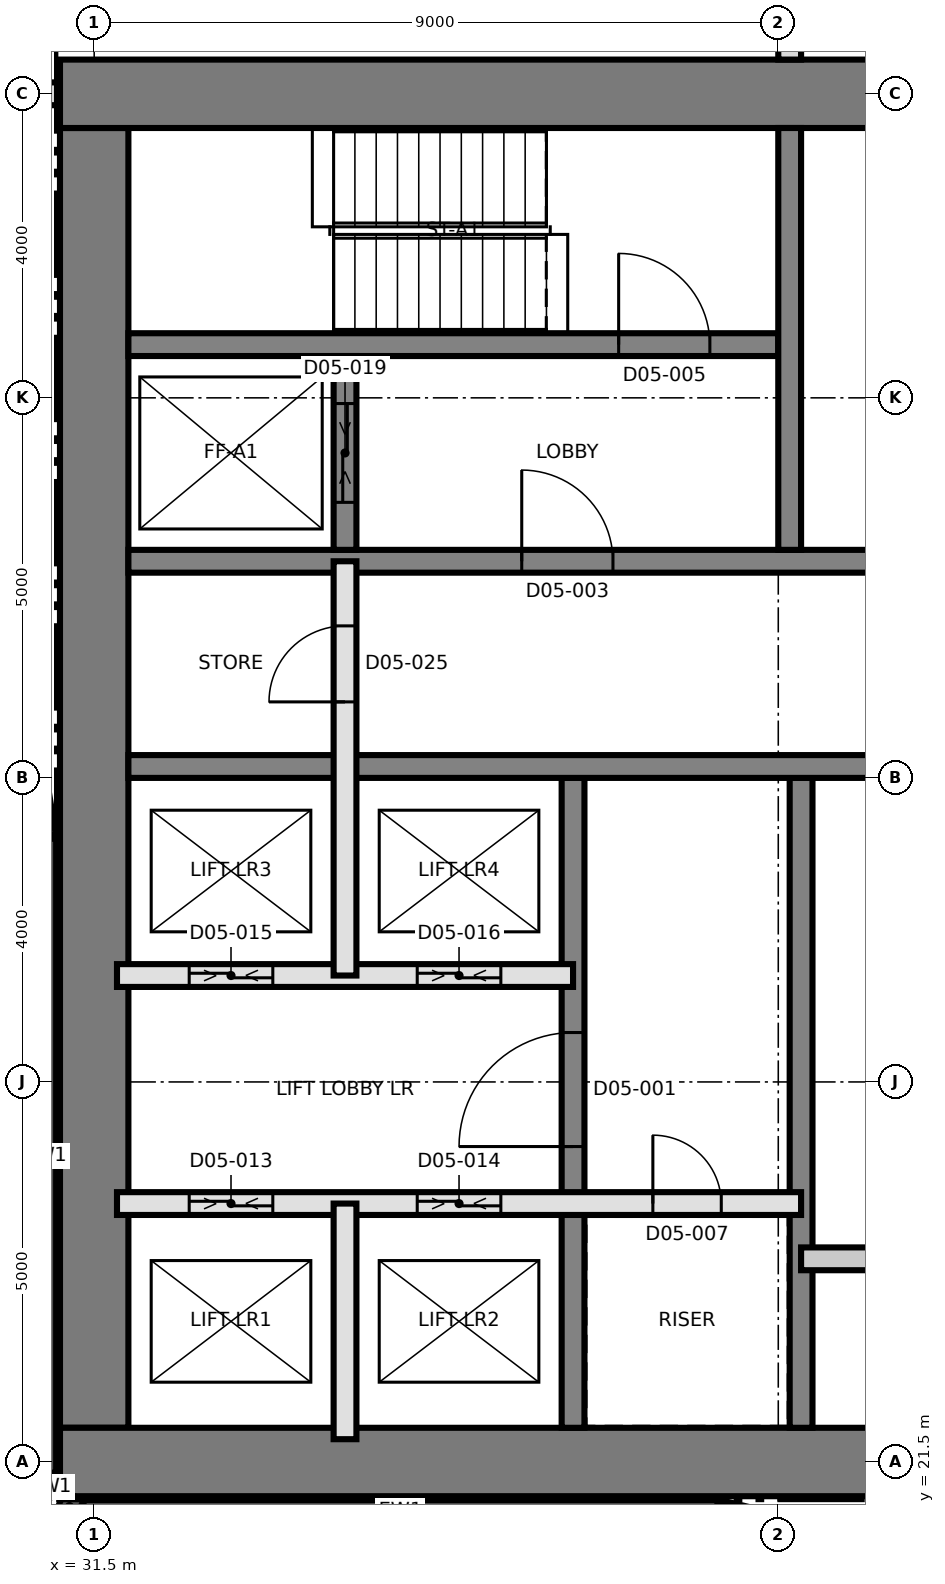
"""IFC4 building model, lengths in metres.
Left out: names, types, materials, properties, quantities, classifications, styles, units other than length and angle.
Written with IfcOpenShell. Run it as: python <this file> out.ifc"""

import sys

from ifc_helpers import new_model, si_unit, direction, frame, frame_2d, origin, place, context, subcontext, project, spatial, rectangle, extrude, element, fill, save


model = new_model("IFC4")
c1 = context("Model", 3, precision=1e-05, world=origin(), true_north=direction((0.0, 1.0)))
c2 = subcontext(c1, "Body", "Model", "MODEL_VIEW")
j1 = project(units=[si_unit("LENGTHUNIT", "METRE"), si_unit("PLANEANGLEUNIT", "RADIAN")], contexts=[c1])
p1 = place(None, origin())
s1 = spatial("IfcSite", under=j1, at=p1, CompositionType="ELEMENT")
p2 = place(p1, origin())
s2 = spatial("IfcBuilding", under=s1, at=p2, CompositionType="ELEMENT")
p3 = place(p2, frame((0.0, 0.0, 70.5)))
s3 = spatial("IfcBuildingStorey", under=s2, at=p3, CompositionType="ELEMENT", Elevation=70.5)
p4 = place(p3, frame((31.5, 21.95, 0.0), z_axis=(0.0, 0.0, 1.0), x_axis=(0.0, 1.0, 0.0)))
e1 = element("IfcWall", 1, at=p4, inside=s3, PredefinedType="SHEAR", context=c2, shape_type="SweptSolid", body=[
    extrude(rectangle(XDim=17.1, YDim=0.9, at=frame_2d((8.55, 0.0))), origin(), (0.0, 0.0, 1.0), 3.7),
])
p5 = place(p3, frame((31.05, 21.5, 0.0), z_axis=(0.0, 0.0, 1.0), x_axis=(1.0, 0.0, 0.0)))
e2 = element("IfcWall", 2, at=p5, inside=s3, PredefinedType="SHEAR", context=c2, shape_type="SweptSolid", body=[
    extrude(rectangle(XDim=27.0, YDim=0.9, at=frame_2d((13.5, 0.0))), origin(), (0.0, 0.0, 1.0), 3.7),
])
p6 = place(p3, frame((31.05, 39.5, 0.0), z_axis=(0.0, 0.0, 1.0), x_axis=(1.0, 0.0, 0.0)))
e3 = element("IfcWall", 3, at=p6, inside=s3, PredefinedType="SHEAR", context=c2, shape_type="SweptSolid", body=[
    extrude(rectangle(XDim=27.0, YDim=0.9, at=frame_2d((13.5, 0.0))), origin(), (0.0, 0.0, 1.0), 3.7),
])
p7 = place(p6, frame((10.65, 0.0, 0.0)))
e4 = element("IfcOpeningElement", 4, at=p7, cuts=e3, PredefinedType="OPENING", context=c2, shape_type="SweptSolid", body=[
    extrude(rectangle(XDim=1.2, YDim=2.1, at=frame_2d((0.6, 1.05))), frame((0.0, 0.46, 0.0), z_axis=(0.0, -1.0, 0.0), x_axis=(1.0, 0.0, 0.0)), (0.0, 0.0, 1.0), 0.92),
])
p8 = place(p3, frame((37.8, 21.95, 0.0), z_axis=(0.0, 0.0, 1.0), x_axis=(0.0, 1.0, 0.0)))
e5 = element("IfcWall", 5, at=p8, inside=s3, PredefinedType="SHEAR", context=c2, shape_type="SweptSolid", body=[
    extrude(rectangle(XDim=8.55, YDim=0.3, at=frame_2d((4.275, 0.0))), origin(), (0.0, 0.0, 1.0), 3.7),
])
p9 = place(p8, frame((3.7, 0.0, 0.0)))
e6 = element("IfcOpeningElement", 6, at=p9, cuts=e5, PredefinedType="OPENING", context=c2, shape_type="SweptSolid", body=[
    extrude(rectangle(XDim=1.5, YDim=2.1, at=frame_2d((0.75, 1.05))), frame((0.0, 0.16, 0.0), z_axis=(0.0, -1.0, 0.0), x_axis=(1.0, 0.0, 0.0)), (0.0, 0.0, 1.0), 0.32),
])
p10 = place(p3, frame((40.8, 21.95, 0.0), z_axis=(0.0, 0.0, 1.0), x_axis=(0.0, 1.0, 0.0)))
e7 = element("IfcWall", 7, at=p10, inside=s3, PredefinedType="SHEAR", context=c2, shape_type="SweptSolid", body=[
    extrude(rectangle(XDim=8.55, YDim=0.3, at=frame_2d((4.275, 0.0))), origin(), (0.0, 0.0, 1.0), 3.7),
])
p11 = place(p3, frame((31.95, 30.65, 0.0), z_axis=(0.0, 0.0, 1.0), x_axis=(1.0, 0.0, 0.0)))
e8 = element("IfcWall", 8, at=p11, inside=s3, PredefinedType="SHEAR", context=c2, shape_type="SweptSolid", body=[
    extrude(rectangle(XDim=26.1, YDim=0.3, at=frame_2d((13.05, 0.0))), origin(), (0.0, 0.0, 1.0), 3.7),
])
p12 = place(p11, frame((24.55, 0.0, 0.0)))
e9 = element("IfcOpeningElement", 9, at=p12, cuts=e8, PredefinedType="OPENING", context=c2, shape_type="SweptSolid", body=[
    extrude(rectangle(XDim=1.0, YDim=2.1, at=frame_2d((0.5, 1.05))), frame((0.0, 0.16, 0.0), z_axis=(0.0, -1.0, 0.0), x_axis=(1.0, 0.0, 0.0)), (0.0, 0.0, 1.0), 0.32),
])
p13 = place(p11, frame((11.35, 0.0, 0.0)))
e10 = element("IfcOpeningElement", 10, at=p13, cuts=e8, PredefinedType="OPENING", context=c2, shape_type="SweptSolid", body=[
    extrude(rectangle(XDim=1.0, YDim=2.1, at=frame_2d((0.5, 1.05))), frame((0.0, 0.16, 0.0), z_axis=(0.0, -1.0, 0.0), x_axis=(1.0, 0.0, 0.0)), (0.0, 0.0, 1.0), 0.32),
])
p14 = place(p3, frame((31.95, 33.35, 0.0), z_axis=(0.0, 0.0, 1.0), x_axis=(1.0, 0.0, 0.0)))
e11 = element("IfcWall", 11, at=p14, inside=s3, PredefinedType="SHEAR", context=c2, shape_type="SweptSolid", body=[
    extrude(rectangle(XDim=26.1, YDim=0.3, at=frame_2d((13.05, 0.0))), origin(), (0.0, 0.0, 1.0), 3.7),
])
p15 = place(p14, frame((13.7, 0.0, 0.0)))
e12 = element("IfcOpeningElement", 12, at=p15, cuts=e11, PredefinedType="OPENING", context=c2, shape_type="SweptSolid", body=[
    extrude(rectangle(XDim=1.4, YDim=2.1, at=frame_2d((0.7, 1.05))), frame((0.0, 0.16, 0.0), z_axis=(0.0, -1.0, 0.0), x_axis=(1.0, 0.0, 0.0)), (0.0, 0.0, 1.0), 0.32),
])
p16 = place(p14, frame((5.175, 0.0, 0.0)))
e13 = element("IfcOpeningElement", 13, at=p16, cuts=e11, PredefinedType="OPENING", context=c2, shape_type="SweptSolid", body=[
    extrude(rectangle(XDim=1.2, YDim=2.1, at=frame_2d((0.6, 1.05))), frame((0.0, 0.16, 0.0), z_axis=(0.0, -1.0, 0.0), x_axis=(1.0, 0.0, 0.0)), (0.0, 0.0, 1.0), 0.32),
])
p17 = place(p14, frame((19.725, 0.0, 0.0)))
e14 = element("IfcOpeningElement", 14, at=p17, cuts=e11, PredefinedType="OPENING", context=c2, shape_type="SweptSolid", body=[
    extrude(rectangle(XDim=1.2, YDim=2.1, at=frame_2d((0.6, 1.05))), frame((0.0, 0.16, 0.0), z_axis=(0.0, -1.0, 0.0), x_axis=(1.0, 0.0, 0.0)), (0.0, 0.0, 1.0), 0.32),
])
p18 = place(p3, frame((31.95, 36.2, 0.0), z_axis=(0.0, 0.0, 1.0), x_axis=(1.0, 0.0, 0.0)))
e15 = element("IfcWall", 15, at=p18, inside=s3, PredefinedType="SHEAR", context=c2, shape_type="SweptSolid", body=[
    extrude(rectangle(XDim=8.55, YDim=0.3, at=frame_2d((4.275, 0.0))), origin(), (0.0, 0.0, 1.0), 3.7),
])
p19 = place(p18, frame((6.45, 0.0, 0.0)))
e16 = element("IfcOpeningElement", 16, at=p19, cuts=e15, PredefinedType="OPENING", context=c2, shape_type="SweptSolid", body=[
    extrude(rectangle(XDim=1.2, YDim=2.1, at=frame_2d((0.6, 1.05))), frame((0.0, 0.16, 0.0), z_axis=(0.0, -1.0, 0.0), x_axis=(1.0, 0.0, 0.0)), (0.0, 0.0, 1.0), 0.32),
])
p20 = place(p3, frame((40.65, 33.5, 0.0), z_axis=(0.0, 0.0, 1.0), x_axis=(0.0, 1.0, 0.0)))
e17 = element("IfcWall", 17, at=p20, inside=s3, PredefinedType="SHEAR", context=c2, shape_type="SweptSolid", body=[
    extrude(rectangle(XDim=5.55, YDim=0.3, at=frame_2d((2.775, 0.0))), origin(), (0.0, 0.0, 1.0), 3.7),
])
p21 = place(p3, frame((34.8, 33.5, 0.0), z_axis=(0.0, 0.0, 1.0), x_axis=(0.0, 1.0, 0.0)))
e18 = element("IfcWall", 18, at=p21, inside=s3, PredefinedType="SHEAR", context=c2, shape_type="SweptSolid", body=[
    extrude(rectangle(XDim=2.55, YDim=0.3, at=frame_2d((1.275, 0.0))), origin(), (0.0, 0.0, 1.0), 3.7),
])
p22 = place(p21, frame((0.625, 0.0, 0.0)))
e19 = element("IfcOpeningElement", 19, at=p22, cuts=e18, PredefinedType="OPENING", context=c2, shape_type="SweptSolid", body=[
    extrude(rectangle(XDim=1.3, YDim=2.4, at=frame_2d((0.65, 1.2))), frame((0.0, 0.16, 0.0), z_axis=(0.0, -1.0, 0.0), x_axis=(1.0, 0.0, 0.0)), (0.0, 0.0, 1.0), 0.32),
])
p23 = place(p3, frame((30.85, 29.699, 0.0), z_axis=(0.0, 0.0, 1.0), x_axis=(0.0, -1.0, 0.0)))
e20 = element("IfcWall", 20, at=p23, inside=s3, PredefinedType="SOLIDWALL", context=c2, shape_type="SweptSolid", body=[
    extrude(rectangle(XDim=8.34, YDim=0.3, at=frame_2d((4.17, 0.0))), origin(), (0.0, 0.0, 1.0), 3.4),
])
for number, where, z_axis, x_axis in (
    (21, (30.861, 21.302, 0.0), (0.0, 0.0, 1.0), (0.383, -0.924, 0.0)),
    (22, (31.048, 20.967, 0.0), (0.0, 0.0, 1.0), (0.924, -0.383, 0.0)),
):
    element("IfcWall", number, at=place(p3, frame(where, z_axis=z_axis, x_axis=x_axis)), inside=s3, PredefinedType="SOLIDWALL", context=c2, shape_type="SweptSolid", body=[
        extrude(rectangle(XDim=0.275, YDim=0.3, at=frame_2d((0.138, 0.0))), origin(), (0.0, 0.0, 1.0), 3.4),
    ])
p24 = place(p3, frame((31.36, 20.85, 0.0), z_axis=(0.0, 0.0, 1.0), x_axis=(1.0, 0.0, 0.0)))
e23 = element("IfcWall", 23, at=p24, inside=s3, PredefinedType="SOLIDWALL", context=c2, shape_type="SweptSolid", body=[
    extrude(rectangle(XDim=8.34, YDim=0.3, at=frame_2d((4.17, 0.0))), origin(), (0.0, 0.0, 1.0), 3.4),
])
p25 = place(p3, frame((39.735, 20.846, 0.0), z_axis=(0.0, 0.0, 1.0), x_axis=(0.97206095595, -0.234728562212, 0.0)))
e24 = element("IfcWall", 24, at=p25, inside=s3, PredefinedType="SOLIDWALL", context=c2, shape_type="SweptSolid", body=[
    extrude(rectangle(XDim=2.35, YDim=0.3, at=frame_2d((1.175, 0.0))), origin(), (0.0, 0.0, 1.0), 3.4),
])
p26 = place(p3, frame((30.152, 34.0, 0.0), z_axis=(0.0, 0.0, 1.0), x_axis=(0.160697303067, -0.987003736967, 0.0)))
e25 = element("IfcWall", 25, at=p26, inside=s3, PredefinedType="SOLIDWALL", context=c2, shape_type="SweptSolid", body=[
    extrude(rectangle(XDim=4.333, YDim=0.3, at=frame_2d((2.167, 0.0))), origin(), (0.0, 0.0, 1.0), 3.4),
])
p27 = place(p26, frame((0.366, 0.0, 0.9)))
e26 = element("IfcOpeningElement", 26, at=p27, cuts=e25, PredefinedType="OPENING", context=c2, shape_type="SweptSolid", body=[
    extrude(rectangle(XDim=3.6, YDim=1.5, at=frame_2d((1.8, 0.75))), frame((0.0, 0.16, 0.0), z_axis=(0.0, -1.0, 0.0), x_axis=(1.0, 0.0, 0.0)), (0.0, 0.0, 1.0), 0.32),
])
p28 = place(p3, frame((40.8, 24.173, 0.0), z_axis=(0.0, 0.0, 1.0), x_axis=(1.0, 0.0, 0.0)))
e27 = element("IfcWall", 27, at=p28, inside=s3, PredefinedType="PARTITIONING", context=c2, shape_type="SweptSolid", body=[
    extrude(rectangle(XDim=6.0, YDim=0.3, at=frame_2d((3.0, 0.0))), origin(), (0.0, 0.0, 1.0), 3.4),
])
p29 = place(p28, frame((2.5, 0.0, 0.0)))
e28 = element("IfcOpeningElement", 28, at=p29, cuts=e27, PredefinedType="OPENING", context=c2, shape_type="SweptSolid", body=[
    extrude(rectangle(XDim=1.0, YDim=2.1, at=frame_2d((0.5, 1.05))), frame((0.0, 0.16, 0.0), z_axis=(0.0, -1.0, 0.0), x_axis=(1.0, 0.0, 0.0)), (0.0, 0.0, 1.0), 0.32),
])
p30 = place(p3, frame((31.8, 24.9, 0.0), z_axis=(0.0, 0.0, 1.0), x_axis=(1.0, 0.0, 0.0)))
e29 = element("IfcWall", 29, at=p30, inside=s3, PredefinedType="SOLIDWALL", context=c2, shape_type="SweptSolid", body=[
    extrude(rectangle(XDim=9.0, YDim=0.3, at=frame_2d((4.5, 0.0))), origin(), (0.0, 0.0, 1.0), 3.4),
])
p31 = place(p30, frame((7.05, 0.0, 0.0)))
e30 = element("IfcOpeningElement", 30, at=p31, cuts=e29, PredefinedType="OPENING", context=c2, shape_type="SweptSolid", body=[
    extrude(rectangle(XDim=0.9, YDim=2.1, at=frame_2d((0.45, 1.05))), frame((0.0, 0.16, 0.0), z_axis=(0.0, -1.0, 0.0), x_axis=(1.0, 0.0, 0.0)), (0.0, 0.0, 1.0), 0.32),
])
p32 = place(p30, frame((0.95, 0.0, 0.0)))
e31 = element("IfcOpeningElement", 31, at=p32, cuts=e29, PredefinedType="OPENING", context=c2, shape_type="SweptSolid", body=[
    extrude(rectangle(XDim=1.1, YDim=2.4, at=frame_2d((0.55, 1.2))), frame((0.0, 0.16, 0.0), z_axis=(0.0, -1.0, 0.0), x_axis=(1.0, 0.0, 0.0)), (0.0, 0.0, 1.0), 0.32),
])
p33 = place(p30, frame((3.95, 0.0, 0.0)))
e32 = element("IfcOpeningElement", 32, at=p33, cuts=e29, PredefinedType="OPENING", context=c2, shape_type="SweptSolid", body=[
    extrude(rectangle(XDim=1.1, YDim=2.4, at=frame_2d((0.55, 1.2))), frame((0.0, 0.16, 0.0), z_axis=(0.0, -1.0, 0.0), x_axis=(1.0, 0.0, 0.0)), (0.0, 0.0, 1.0), 0.32),
])
p34 = place(p3, frame((31.8, 27.9, 0.0), z_axis=(0.0, 0.0, 1.0), x_axis=(1.0, 0.0, 0.0)))
e33 = element("IfcWall", 33, at=p34, inside=s3, PredefinedType="SOLIDWALL", context=c2, shape_type="SweptSolid", body=[
    extrude(rectangle(XDim=6.0, YDim=0.3, at=frame_2d((3.0, 0.0))), origin(), (0.0, 0.0, 1.0), 3.4),
])
p35 = place(p34, frame((0.95, 0.0, 0.0)))
e34 = element("IfcOpeningElement", 34, at=p35, cuts=e33, PredefinedType="OPENING", context=c2, shape_type="SweptSolid", body=[
    extrude(rectangle(XDim=1.1, YDim=2.4, at=frame_2d((0.55, 1.2))), frame((0.0, 0.16, 0.0), z_axis=(0.0, -1.0, 0.0), x_axis=(1.0, 0.0, 0.0)), (0.0, 0.0, 1.0), 0.32),
])
p36 = place(p34, frame((3.95, 0.0, 0.0)))
e35 = element("IfcOpeningElement", 35, at=p36, cuts=e33, PredefinedType="OPENING", context=c2, shape_type="SweptSolid", body=[
    extrude(rectangle(XDim=1.1, YDim=2.4, at=frame_2d((0.55, 1.2))), frame((0.0, 0.16, 0.0), z_axis=(0.0, -1.0, 0.0), x_axis=(1.0, 0.0, 0.0)), (0.0, 0.0, 1.0), 0.32),
])
p37 = place(p3, frame((34.8, 21.8, 0.0), z_axis=(0.0, 0.0, 1.0), x_axis=(0.0, 1.0, 0.0)))
e36 = element("IfcWall", 36, at=p37, inside=s3, PredefinedType="SOLIDWALL", context=c2, shape_type="SweptSolid", body=[
    extrude(rectangle(XDim=3.1, YDim=0.3, at=frame_2d((1.55, 0.0))), origin(), (0.0, 0.0, 1.0), 3.4),
])
p38 = place(p3, frame((34.8, 27.9, 0.0), z_axis=(0.0, 0.0, 1.0), x_axis=(0.0, 1.0, 0.0)))
e37 = element("IfcWall", 37, at=p38, inside=s3, PredefinedType="SOLIDWALL", context=c2, shape_type="SweptSolid", body=[
    extrude(rectangle(XDim=5.45, YDim=0.3, at=frame_2d((2.725, 0.0))), origin(), (0.0, 0.0, 1.0), 3.4),
])
p39 = place(p38, frame((3.6, 0.0, 0.0)))
e38 = element("IfcOpeningElement", 38, at=p39, cuts=e37, PredefinedType="OPENING", context=c2, shape_type="SweptSolid", body=[
    extrude(rectangle(XDim=1.0, YDim=2.1, at=frame_2d((0.5, 1.05))), frame((0.0, 0.16, 0.0), z_axis=(0.0, -1.0, 0.0), x_axis=(1.0, 0.0, 0.0)), (0.0, 0.0, 1.0), 0.32),
])
p40 = place(p3, frame((30.35, 39.5, 0.0), z_axis=(0.0, 0.0, 1.0), x_axis=(1.0, 0.0, 0.0)))
e39 = element("IfcWall", 39, at=p40, inside=s3, PredefinedType="PARTITIONING", context=c2, shape_type="SweptSolid", body=[
    extrude(rectangle(XDim=0.68, YDim=0.3, at=frame_2d((0.34, 0.0))), origin(), (0.0, 0.0, 1.0), 3.4),
])
p41 = place(p3, frame((40.65, 39.95, 0.0), z_axis=(0.0, 0.0, 1.0), x_axis=(0.0, 1.0, 0.0)))
e40 = element("IfcWall", 40, at=p41, inside=s3, PredefinedType="PARTITIONING", context=c2, shape_type="SweptSolid", body=[
    extrude(rectangle(XDim=36.94, YDim=0.3, at=frame_2d((18.47, 0.0))), origin(), (0.0, 0.0, 1.0), 3.4),
])
p42 = place(p41, frame((0.7, 0.0, 0.0)))
e41 = element("IfcOpeningElement", 41, at=p42, cuts=e40, PredefinedType="OPENING", context=c2, shape_type="SweptSolid", body=[
    extrude(rectangle(XDim=1.0, YDim=2.1, at=frame_2d((0.5, 1.05))), frame((0.0, 0.16, 0.0), z_axis=(0.0, -1.0, 0.0), x_axis=(1.0, 0.0, 0.0)), (0.0, 0.0, 1.0), 0.32),
])
p43 = place(p41, frame((6.55, 0.0, 0.0)))
e42 = element("IfcOpeningElement", 42, at=p43, cuts=e40, PredefinedType="OPENING", context=c2, shape_type="SweptSolid", body=[
    extrude(rectangle(XDim=1.0, YDim=2.1, at=frame_2d((0.5, 1.05))), frame((0.0, 0.16, 0.0), z_axis=(0.0, -1.0, 0.0), x_axis=(1.0, 0.0, 0.0)), (0.0, 0.0, 1.0), 0.32),
])
p44 = place(p41, frame((9.22, 0.0, 0.0)))
e43 = element("IfcOpeningElement", 43, at=p44, cuts=e40, PredefinedType="OPENING", context=c2, shape_type="SweptSolid", body=[
    extrude(rectangle(XDim=1.0, YDim=2.1, at=frame_2d((0.5, 1.05))), frame((0.0, 0.16, 0.0), z_axis=(0.0, -1.0, 0.0), x_axis=(1.0, 0.0, 0.0)), (0.0, 0.0, 1.0), 0.32),
])
p45 = place(p41, frame((15.07, 0.0, 0.0)))
e44 = element("IfcOpeningElement", 44, at=p45, cuts=e40, PredefinedType="OPENING", context=c2, shape_type="SweptSolid", body=[
    extrude(rectangle(XDim=1.0, YDim=2.1, at=frame_2d((0.5, 1.05))), frame((0.0, 0.16, 0.0), z_axis=(0.0, -1.0, 0.0), x_axis=(1.0, 0.0, 0.0)), (0.0, 0.0, 1.0), 0.32),
])
p46 = place(p41, frame((21.05, 0.0, 0.0)))
e45 = element("IfcOpeningElement", 45, at=p46, cuts=e40, PredefinedType="OPENING", context=c2, shape_type="SweptSolid", body=[
    extrude(rectangle(XDim=1.0, YDim=2.4, at=frame_2d((0.5, 1.2))), frame((0.0, 0.16, 0.0), z_axis=(0.0, -1.0, 0.0), x_axis=(1.0, 0.0, 0.0)), (0.0, 0.0, 1.0), 0.32),
])
p47 = place(p9, origin())
e46 = element("IfcDoor", 46, at=p47, inside=s3, OperationType="SINGLE_SWING_LEFT", PredefinedType="DOOR", context=c2, shape_type="SweptSolid", body=[
    extrude(rectangle(XDim=1.5, YDim=2.1, at=frame_2d((0.75, 1.05))), frame((0.0, 0.025, 0.0), z_axis=(0.0, -1.0, 0.0), x_axis=(1.0, 0.0, 0.0)), (0.0, 0.0, 1.0), 0.05),
])
fill(e6, e46)
p48 = place(p16, origin())
e47 = element("IfcDoor", 47, at=p48, inside=s3, OperationType="SINGLE_SWING_LEFT", PredefinedType="DOOR", context=c2, shape_type="SweptSolid", body=[
    extrude(rectangle(XDim=1.2, YDim=2.1, at=frame_2d((0.6, 1.05))), frame((0.0, 0.025, 0.0), z_axis=(0.0, -1.0, 0.0), x_axis=(1.0, 0.0, 0.0)), (0.0, 0.0, 1.0), 0.05),
])
fill(e13, e47)
p49 = place(p19, origin())
e48 = element("IfcDoor", 48, at=p49, inside=s3, OperationType="SINGLE_SWING_RIGHT", PredefinedType="DOOR", context=c2, shape_type="SweptSolid", body=[
    extrude(rectangle(XDim=1.2, YDim=2.1, at=frame_2d((0.6, 1.05))), frame((0.0, 0.025, 0.0), z_axis=(0.0, -1.0, 0.0), x_axis=(1.0, 0.0, 0.0)), (0.0, 0.0, 1.0), 0.05),
])
fill(e16, e48)
p50 = place(p31, origin())
e49 = element("IfcDoor", 49, at=p50, inside=s3, OperationType="SINGLE_SWING_LEFT", PredefinedType="DOOR", context=c2, shape_type="SweptSolid", body=[
    extrude(rectangle(XDim=0.9, YDim=2.1, at=frame_2d((0.45, 1.05))), frame((0.0, 0.025, 0.0), z_axis=(0.0, -1.0, 0.0), x_axis=(1.0, 0.0, 0.0)), (0.0, 0.0, 1.0), 0.05),
])
fill(e30, e49)
p51 = place(p32, origin())
e50 = element("IfcDoor", 50, at=p51, inside=s3, OperationType="SLIDING_TO_LEFT", PredefinedType="DOOR", context=c2, shape_type="SweptSolid", body=[
    extrude(rectangle(XDim=1.1, YDim=2.4, at=frame_2d((0.55, 1.2))), frame((0.0, 0.025, 0.0), z_axis=(0.0, -1.0, 0.0), x_axis=(1.0, 0.0, 0.0)), (0.0, 0.0, 1.0), 0.05),
])
fill(e31, e50)
p52 = place(p33, origin())
e51 = element("IfcDoor", 51, at=p52, inside=s3, OperationType="SLIDING_TO_LEFT", PredefinedType="DOOR", context=c2, shape_type="SweptSolid", body=[
    extrude(rectangle(XDim=1.1, YDim=2.4, at=frame_2d((0.55, 1.2))), frame((0.0, 0.025, 0.0), z_axis=(0.0, -1.0, 0.0), x_axis=(1.0, 0.0, 0.0)), (0.0, 0.0, 1.0), 0.05),
])
fill(e32, e51)
p53 = place(p35, origin())
e52 = element("IfcDoor", 52, at=p53, inside=s3, OperationType="SLIDING_TO_LEFT", PredefinedType="DOOR", context=c2, shape_type="SweptSolid", body=[
    extrude(rectangle(XDim=1.1, YDim=2.4, at=frame_2d((0.55, 1.2))), frame((0.0, 0.025, 0.0), z_axis=(0.0, -1.0, 0.0), x_axis=(1.0, 0.0, 0.0)), (0.0, 0.0, 1.0), 0.05),
])
fill(e34, e52)
p54 = place(p36, origin())
e53 = element("IfcDoor", 53, at=p54, inside=s3, OperationType="SLIDING_TO_LEFT", PredefinedType="DOOR", context=c2, shape_type="SweptSolid", body=[
    extrude(rectangle(XDim=1.1, YDim=2.4, at=frame_2d((0.55, 1.2))), frame((0.0, 0.025, 0.0), z_axis=(0.0, -1.0, 0.0), x_axis=(1.0, 0.0, 0.0)), (0.0, 0.0, 1.0), 0.05),
])
fill(e35, e53)
p55 = place(p22, origin())
e54 = element("IfcDoor", 54, at=p55, inside=s3, OperationType="SLIDING_TO_LEFT", PredefinedType="DOOR", context=c2, shape_type="SweptSolid", body=[
    extrude(rectangle(XDim=1.3, YDim=2.4, at=frame_2d((0.65, 1.2))), frame((0.0, 0.025, 0.0), z_axis=(0.0, -1.0, 0.0), x_axis=(1.0, 0.0, 0.0)), (0.0, 0.0, 1.0), 0.05),
])
fill(e19, e54)
p56 = place(p39, origin())
e55 = element("IfcDoor", 55, at=p56, inside=s3, OperationType="SINGLE_SWING_LEFT", PredefinedType="DOOR", context=c2, shape_type="SweptSolid", body=[
    extrude(rectangle(XDim=1.0, YDim=2.1, at=frame_2d((0.5, 1.05))), frame((0.0, 0.025, 0.0), z_axis=(0.0, -1.0, 0.0), x_axis=(1.0, 0.0, 0.0)), (0.0, 0.0, 1.0), 0.05),
])
fill(e38, e55)
save(model, sys.argv[1])
